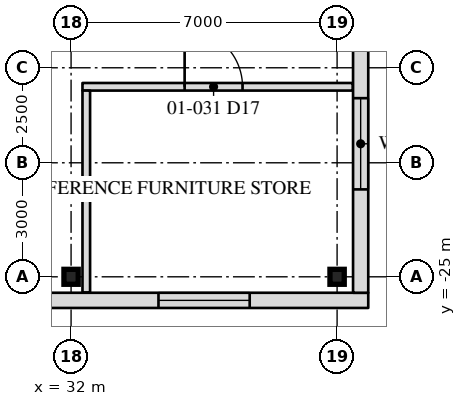
"""IFC4 building model, lengths in metres.
Left out: names, types, materials, properties, quantities, classifications, styles, units other than length and angle.
Written with IfcOpenShell. Run it as: python <this file> out.ifc"""

import sys

from ifc_helpers import new_model, si_unit, direction, frame, frame_2d, origin, origin_2d, place, context, subcontext, project, spatial, rectangle, i_section, extrude, element, fill, save


model = new_model("IFC4")
c1 = context("Model", 3, precision=1e-05, world=origin(), true_north=direction((0.0, 1.0)))
c2 = subcontext(c1, "Body", "Model", "MODEL_VIEW")
j1 = project(units=[si_unit("LENGTHUNIT", "METRE"), si_unit("PLANEANGLEUNIT", "RADIAN")], contexts=[c1])
p1 = place(None, origin())
s1 = spatial("IfcSite", under=j1, at=p1, CompositionType="ELEMENT")
p2 = place(p1, origin())
s2 = spatial("IfcBuilding", under=s1, at=p2, CompositionType="ELEMENT")
p3 = place(p2, frame((0.0, 0.0, 6.0)))
s3 = spatial("IfcBuildingStorey", under=s2, at=p3, CompositionType="ELEMENT", Elevation=6.0)
for number, where, z_axis, x_axis in (
    (1, (32.0, -25.0, 0.0), (0.0, 0.0, 1.0), (0.0, 1.0, 0.0)),
    (2, (39.0, -25.0, 0.0), (0.0, 0.0, 1.0), (0.0, 1.0, 0.0)),
):
    element("IfcColumn", number, at=place(p3, frame(where, z_axis=z_axis, x_axis=x_axis)), inside=s3, PredefinedType="COLUMN", context=c2, shape_type="SweptSolid", body=[
        extrude(i_section(OverallWidth=0.394, OverallDepth=0.376, WebThickness=0.017, FlangeThickness=0.028, at=origin_2d()), origin(), (0.0, 0.0, 1.0), 5.0),
    ])
p4 = place(p3, frame((-39.82, -25.62, -0.19), z_axis=(0.0, 0.0, 1.0), x_axis=(1.0, 0.0, 0.0)))
e3 = element("IfcWall", 3, at=p4, inside=s3, PredefinedType="SOLIDWALL", context=c2, shape_type="SweptSolid", body=[
    extrude(rectangle(XDim=79.64, YDim=0.4, at=frame_2d((39.82, 0.0))), origin(), (0.0, 0.0, 1.0), 5.0),
])
p5 = place(p4, frame((3.12, 0.0, 1.09)))
e4 = element("IfcOpeningElement", 4, at=p5, cuts=e3, PredefinedType="OPENING", context=c2, shape_type="SweptSolid", body=[
    extrude(rectangle(XDim=2.4, YDim=2.7, at=frame_2d((1.2, 1.35))), frame((0.0, 0.21, 0.0), z_axis=(0.0, -1.0, 0.0), x_axis=(1.0, 0.0, 0.0)), (0.0, 0.0, 1.0), 0.42),
])
p6 = place(p4, frame((10.12, 0.0, 1.09)))
e5 = element("IfcOpeningElement", 5, at=p6, cuts=e3, PredefinedType="OPENING", context=c2, shape_type="SweptSolid", body=[
    extrude(rectangle(XDim=2.4, YDim=2.7, at=frame_2d((1.2, 1.35))), frame((0.0, 0.21, 0.0), z_axis=(0.0, -1.0, 0.0), x_axis=(1.0, 0.0, 0.0)), (0.0, 0.0, 1.0), 0.42),
])
p7 = place(p4, frame((17.12, 0.0, 1.09)))
e6 = element("IfcOpeningElement", 6, at=p7, cuts=e3, PredefinedType="OPENING", context=c2, shape_type="SweptSolid", body=[
    extrude(rectangle(XDim=2.4, YDim=2.7, at=frame_2d((1.2, 1.35))), frame((0.0, 0.21, 0.0), z_axis=(0.0, -1.0, 0.0), x_axis=(1.0, 0.0, 0.0)), (0.0, 0.0, 1.0), 0.42),
])
p8 = place(p4, frame((24.12, 0.0, 1.09)))
e7 = element("IfcOpeningElement", 7, at=p8, cuts=e3, PredefinedType="OPENING", context=c2, shape_type="SweptSolid", body=[
    extrude(rectangle(XDim=2.4, YDim=2.7, at=frame_2d((1.2, 1.35))), frame((0.0, 0.21, 0.0), z_axis=(0.0, -1.0, 0.0), x_axis=(1.0, 0.0, 0.0)), (0.0, 0.0, 1.0), 0.42),
])
p9 = place(p4, frame((33.12, 0.0, 1.09)))
e8 = element("IfcOpeningElement", 8, at=p9, cuts=e3, PredefinedType="OPENING", context=c2, shape_type="SweptSolid", body=[
    extrude(rectangle(XDim=2.4, YDim=2.7, at=frame_2d((1.2, 1.35))), frame((0.0, 0.21, 0.0), z_axis=(0.0, -1.0, 0.0), x_axis=(1.0, 0.0, 0.0)), (0.0, 0.0, 1.0), 0.42),
])
p10 = place(p4, frame((44.12, 0.0, 1.09)))
e9 = element("IfcOpeningElement", 9, at=p10, cuts=e3, PredefinedType="OPENING", context=c2, shape_type="SweptSolid", body=[
    extrude(rectangle(XDim=2.4, YDim=2.7, at=frame_2d((1.2, 1.35))), frame((0.0, 0.21, 0.0), z_axis=(0.0, -1.0, 0.0), x_axis=(1.0, 0.0, 0.0)), (0.0, 0.0, 1.0), 0.42),
])
p11 = place(p4, frame((53.12, 0.0, 1.09)))
e10 = element("IfcOpeningElement", 10, at=p11, cuts=e3, PredefinedType="OPENING", context=c2, shape_type="SweptSolid", body=[
    extrude(rectangle(XDim=2.4, YDim=2.7, at=frame_2d((1.2, 1.35))), frame((0.0, 0.21, 0.0), z_axis=(0.0, -1.0, 0.0), x_axis=(1.0, 0.0, 0.0)), (0.0, 0.0, 1.0), 0.42),
])
p12 = place(p4, frame((60.12, 0.0, 1.09)))
e11 = element("IfcOpeningElement", 11, at=p12, cuts=e3, PredefinedType="OPENING", context=c2, shape_type="SweptSolid", body=[
    extrude(rectangle(XDim=2.4, YDim=2.7, at=frame_2d((1.2, 1.35))), frame((0.0, 0.21, 0.0), z_axis=(0.0, -1.0, 0.0), x_axis=(1.0, 0.0, 0.0)), (0.0, 0.0, 1.0), 0.42),
])
p13 = place(p4, frame((67.12, 0.0, 1.09)))
e12 = element("IfcOpeningElement", 12, at=p13, cuts=e3, PredefinedType="OPENING", context=c2, shape_type="SweptSolid", body=[
    extrude(rectangle(XDim=2.4, YDim=2.7, at=frame_2d((1.2, 1.35))), frame((0.0, 0.21, 0.0), z_axis=(0.0, -1.0, 0.0), x_axis=(1.0, 0.0, 0.0)), (0.0, 0.0, 1.0), 0.42),
])
p14 = place(p4, frame((74.12, 0.0, 1.09)))
e13 = element("IfcOpeningElement", 13, at=p14, cuts=e3, PredefinedType="OPENING", context=c2, shape_type="SweptSolid", body=[
    extrude(rectangle(XDim=2.4, YDim=2.7, at=frame_2d((1.2, 1.35))), frame((0.0, 0.21, 0.0), z_axis=(0.0, -1.0, 0.0), x_axis=(1.0, 0.0, 0.0)), (0.0, 0.0, 1.0), 0.42),
])
p15 = place(p3, frame((39.62, -25.42, -0.19), z_axis=(0.0, 0.0, 1.0), x_axis=(0.0, 1.0, 0.0)))
e14 = element("IfcWall", 14, at=p15, inside=s3, PredefinedType="SOLIDWALL", context=c2, shape_type="SweptSolid", body=[
    extrude(rectangle(XDim=50.84, YDim=0.4, at=frame_2d((25.42, 0.0))), origin(), (0.0, 0.0, 1.0), 5.0),
])
p16 = place(p15, frame((2.72, 0.0, 1.09)))
e15 = element("IfcOpeningElement", 15, at=p16, cuts=e14, PredefinedType="OPENING", context=c2, shape_type="SweptSolid", body=[
    extrude(rectangle(XDim=2.4, YDim=2.7, at=frame_2d((1.2, 1.35))), frame((0.0, 0.21, 0.0), z_axis=(0.0, -1.0, 0.0), x_axis=(1.0, 0.0, 0.0)), (0.0, 0.0, 1.0), 0.42),
])
p17 = place(p15, frame((9.72, 0.0, 1.09)))
e16 = element("IfcOpeningElement", 16, at=p17, cuts=e14, PredefinedType="OPENING", context=c2, shape_type="SweptSolid", body=[
    extrude(rectangle(XDim=2.4, YDim=2.7, at=frame_2d((1.2, 1.35))), frame((0.0, 0.21, 0.0), z_axis=(0.0, -1.0, 0.0), x_axis=(1.0, 0.0, 0.0)), (0.0, 0.0, 1.0), 0.42),
])
p18 = place(p15, frame((18.72, 0.0, 1.09)))
e17 = element("IfcOpeningElement", 17, at=p18, cuts=e14, PredefinedType="OPENING", context=c2, shape_type="SweptSolid", body=[
    extrude(rectangle(XDim=2.4, YDim=2.7, at=frame_2d((1.2, 1.35))), frame((0.0, 0.21, 0.0), z_axis=(0.0, -1.0, 0.0), x_axis=(1.0, 0.0, 0.0)), (0.0, 0.0, 1.0), 0.42),
])
p19 = place(p15, frame((29.72, 0.0, 1.09)))
e18 = element("IfcOpeningElement", 18, at=p19, cuts=e14, PredefinedType="OPENING", context=c2, shape_type="SweptSolid", body=[
    extrude(rectangle(XDim=2.4, YDim=2.7, at=frame_2d((1.2, 1.35))), frame((0.0, 0.21, 0.0), z_axis=(0.0, -1.0, 0.0), x_axis=(1.0, 0.0, 0.0)), (0.0, 0.0, 1.0), 0.42),
])
p20 = place(p15, frame((38.72, 0.0, 1.09)))
e19 = element("IfcOpeningElement", 19, at=p20, cuts=e14, PredefinedType="OPENING", context=c2, shape_type="SweptSolid", body=[
    extrude(rectangle(XDim=2.4, YDim=2.7, at=frame_2d((1.2, 1.35))), frame((0.0, 0.21, 0.0), z_axis=(0.0, -1.0, 0.0), x_axis=(1.0, 0.0, 0.0)), (0.0, 0.0, 1.0), 0.42),
])
p21 = place(p15, frame((45.72, 0.0, 1.09)))
e20 = element("IfcOpeningElement", 20, at=p21, cuts=e14, PredefinedType="OPENING", context=c2, shape_type="SweptSolid", body=[
    extrude(rectangle(XDim=2.4, YDim=2.7, at=frame_2d((1.2, 1.35))), frame((0.0, 0.21, 0.0), z_axis=(0.0, -1.0, 0.0), x_axis=(1.0, 0.0, 0.0)), (0.0, 0.0, 1.0), 0.42),
])
p22 = place(p3, frame((32.3, -20.0, 0.0), z_axis=(0.0, 0.0, 1.0), x_axis=(1.0, 0.0, 0.0)))
e21 = element("IfcWall", 21, at=p22, inside=s3, PredefinedType="PARTITIONING", context=c2, shape_type="SweptSolid", body=[
    extrude(rectangle(XDim=7.11, YDim=0.2, at=frame_2d((3.555, 0.0))), origin(), (0.0, 0.0, 1.0), 4.81),
])
p23 = place(p22, frame((2.688, 0.0, 0.0)))
e22 = element("IfcOpeningElement", 22, at=p23, cuts=e21, PredefinedType="OPENING", context=c2, shape_type="SweptSolid", body=[
    extrude(rectangle(XDim=1.524, YDim=2.134, at=frame_2d((0.762, 1.067))), frame((0.0, 0.11, 0.0), z_axis=(0.0, -1.0, 0.0), x_axis=(1.0, 0.0, 0.0)), (0.0, 0.0, 1.0), 0.22),
])
p24 = place(p3, frame((32.4, -25.41, 0.0), z_axis=(0.0, 0.0, 1.0), x_axis=(0.0, 1.0, 0.0)))
e23 = element("IfcWall", 23, at=p24, inside=s3, PredefinedType="PARTITIONING", context=c2, shape_type="SweptSolid", body=[
    extrude(rectangle(XDim=5.31, YDim=0.2, at=frame_2d((2.655, 0.0))), origin(), (0.0, 0.0, 1.0), 4.81),
])
p25 = place(p14, origin())
e24 = element("IfcWindow", 24, at=p25, inside=s3, PartitioningType="SINGLE_PANEL", PredefinedType="WINDOW", context=c2, shape_type="SweptSolid", body=[
    extrude(rectangle(XDim=2.4, YDim=2.7, at=frame_2d((1.2, 1.35))), frame((0.0, 0.03, 0.0), z_axis=(0.0, -1.0, 0.0), x_axis=(1.0, 0.0, 0.0)), (0.0, 0.0, 1.0), 0.06),
])
fill(e13, e24)
p26 = place(p16, origin())
e25 = element("IfcWindow", 25, at=p26, inside=s3, PartitioningType="SINGLE_PANEL", PredefinedType="WINDOW", context=c2, shape_type="SweptSolid", body=[
    extrude(rectangle(XDim=2.4, YDim=2.7, at=frame_2d((1.2, 1.35))), frame((0.0, 0.03, 0.0), z_axis=(0.0, -1.0, 0.0), x_axis=(1.0, 0.0, 0.0)), (0.0, 0.0, 1.0), 0.06),
])
fill(e15, e25)
p27 = place(p23, origin())
e26 = element("IfcDoor", 26, at=p27, inside=s3, OperationType="DOUBLE_DOOR_SINGLE_SWING", PredefinedType="DOOR", context=c2, shape_type="SweptSolid", body=[
    extrude(rectangle(XDim=1.524, YDim=2.134, at=frame_2d((0.762, 1.067))), frame((0.0, 0.025, 0.0), z_axis=(0.0, -1.0, 0.0), x_axis=(1.0, 0.0, 0.0)), (0.0, 0.0, 1.0), 0.05),
])
fill(e22, e26)
save(model, sys.argv[1])
